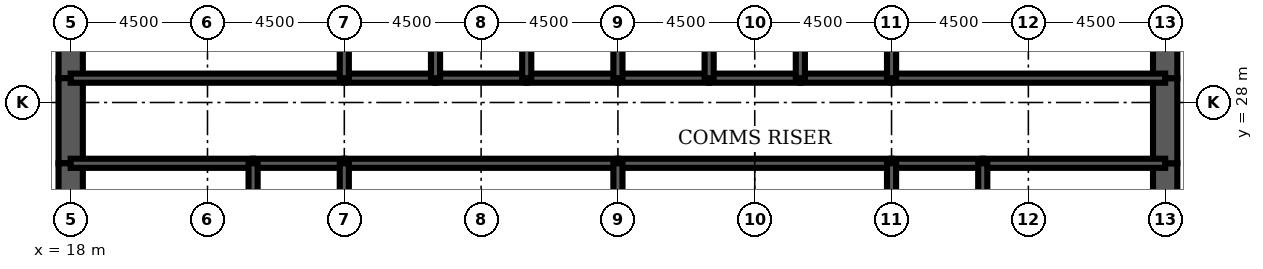
"""IFC4 building model, lengths in metres.
Left out: names, types, materials, properties, quantities, classifications, styles, units other than length and angle.
Written with IfcOpenShell. Run it as: python <this file> out.ifc"""

import sys

from ifc_helpers import new_model, si_unit, direction, frame, frame_2d, origin, place, context, subcontext, project, spatial, rectangle, extrude, element, fill, save


model = new_model("IFC4")
c1 = context("Model", 3, precision=1e-05, world=origin(), true_north=direction((0.0, 1.0)))
c2 = subcontext(c1, "Body", "Model", "MODEL_VIEW")
j1 = project(units=[si_unit("LENGTHUNIT", "METRE"), si_unit("PLANEANGLEUNIT", "RADIAN")], contexts=[c1])
p1 = place(None, origin())
s1 = spatial("IfcSite", under=j1, at=p1, CompositionType="ELEMENT")
p2 = place(p1, origin())
s2 = spatial("IfcBuilding", under=s1, at=p2, CompositionType="ELEMENT")
p3 = place(p2, frame((0.0, 0.0, 215.2)))
s3 = spatial("IfcBuildingStorey", under=s2, at=p3, CompositionType="ELEMENT", Elevation=215.2)
p4 = place(p3, frame((18.0, 32.0, 0.0), z_axis=(0.0, 0.0, 1.0), x_axis=(0.0, -1.0, 0.0)))
e1 = element("IfcWall", 1, at=p4, inside=s3, PredefinedType="SHEAR", context=c2, shape_type="SweptSolid", body=[
    extrude(rectangle(XDim=3.2, YDim=0.8, at=frame_2d((1.6, 0.0))), origin(), (0.0, 0.0, 1.0), 4.2),
])
p5 = place(p3, frame((18.0, 28.8, 0.0), z_axis=(0.0, 0.0, 1.0), x_axis=(0.0, -1.0, 0.0)))
e2 = element("IfcWall", 2, at=p5, inside=s3, PredefinedType="SHEAR", context=c2, shape_type="SweptSolid", body=[
    extrude(rectangle(XDim=2.8, YDim=0.8, at=frame_2d((1.4, 0.0))), origin(), (0.0, 0.0, 1.0), 4.2),
])
p6 = place(p5, frame((0.4, 0.0, 0.0)))
e3 = element("IfcOpeningElement", 3, at=p6, cuts=e2, PredefinedType="OPENING", context=c2, shape_type="SweptSolid", body=[
    extrude(rectangle(XDim=1.8, YDim=2.1, at=frame_2d((0.9, 1.05))), frame((0.0, 0.41, 0.0), z_axis=(0.0, -1.0, 0.0), x_axis=(1.0, 0.0, 0.0)), (0.0, 0.0, 1.0), 0.82),
])
for number, where, z_axis, x_axis in (
    (4, (18.0, 26.0, 0.0), (0.0, 0.0, 1.0), (0.0, -1.0, 0.0)),
    (5, (54.0, 22.0, 0.0), (0.0, 0.0, 1.0), (0.0, 1.0, 0.0)),
):
    element("IfcWall", number, at=place(p3, frame(where, z_axis=z_axis, x_axis=x_axis)), inside=s3, PredefinedType="SHEAR", context=c2, shape_type="SweptSolid", body=[
        extrude(rectangle(XDim=4.0, YDim=0.8, at=frame_2d((2.0, 0.0))), origin(), (0.0, 0.0, 1.0), 4.2),
    ])
p7 = place(p3, frame((54.0, 26.0, 0.0), z_axis=(0.0, 0.0, 1.0), x_axis=(0.0, 1.0, 0.0)))
e6 = element("IfcWall", 6, at=p7, inside=s3, PredefinedType="SHEAR", context=c2, shape_type="SweptSolid", body=[
    extrude(rectangle(XDim=2.8, YDim=0.8, at=frame_2d((1.4, 0.0))), origin(), (0.0, 0.0, 1.0), 4.2),
])
p8 = place(p7, frame((0.6, 0.0, 0.0)))
e7 = element("IfcOpeningElement", 7, at=p8, cuts=e6, PredefinedType="OPENING", context=c2, shape_type="SweptSolid", body=[
    extrude(rectangle(XDim=1.8, YDim=2.1, at=frame_2d((0.9, 1.05))), frame((0.0, 0.41, 0.0), z_axis=(0.0, -1.0, 0.0), x_axis=(1.0, 0.0, 0.0)), (0.0, 0.0, 1.0), 0.82),
])
p9 = place(p3, frame((54.0, 28.8, 0.0), z_axis=(0.0, 0.0, 1.0), x_axis=(0.0, 1.0, 0.0)))
e8 = element("IfcWall", 8, at=p9, inside=s3, PredefinedType="SHEAR", context=c2, shape_type="SweptSolid", body=[
    extrude(rectangle(XDim=3.2, YDim=0.8, at=frame_2d((1.6, 0.0))), origin(), (0.0, 0.0, 1.0), 4.2),
])
p10 = place(p3, frame((18.0, 28.8, 0.0), z_axis=(0.0, 0.0, 1.0), x_axis=(1.0, 0.0, 0.0)))
e9 = element("IfcWall", 9, at=p10, inside=s3, PredefinedType="SOLIDWALL", context=c2, shape_type="SweptSolid", body=[
    extrude(rectangle(XDim=9.0, YDim=0.3, at=frame_2d((4.5, 0.0))), origin(), (0.0, 0.0, 1.0), 4.2),
])
p11 = place(p10, frame((0.65, 0.0, 0.0)))
e10 = element("IfcOpeningElement", 10, at=p11, cuts=e9, PredefinedType="OPENING", context=c2, shape_type="SweptSolid", body=[
    extrude(rectangle(XDim=1.0, YDim=2.1, at=frame_2d((0.5, 1.05))), frame((0.0, 0.16, 0.0), z_axis=(0.0, -1.0, 0.0), x_axis=(1.0, 0.0, 0.0)), (0.0, 0.0, 1.0), 0.32),
])
p12 = place(p3, frame((27.0, 28.8, 0.0), z_axis=(0.0, 0.0, 1.0), x_axis=(1.0, 0.0, 0.0)))
e11 = element("IfcWall", 11, at=p12, inside=s3, PredefinedType="SOLIDWALL", context=c2, shape_type="SweptSolid", body=[
    extrude(rectangle(XDim=3.0, YDim=0.3, at=frame_2d((1.5, 0.0))), origin(), (0.0, 0.0, 1.0), 4.2),
])
p13 = place(p12, frame((0.95, 0.0, 0.0)))
e12 = element("IfcOpeningElement", 12, at=p13, cuts=e11, PredefinedType="OPENING", context=c2, shape_type="SweptSolid", body=[
    extrude(rectangle(XDim=1.1, YDim=2.2, at=frame_2d((0.55, 1.1))), frame((0.0, 0.16, 0.0), z_axis=(0.0, -1.0, 0.0), x_axis=(1.0, 0.0, 0.0)), (0.0, 0.0, 1.0), 0.32),
])
p14 = place(p3, frame((30.0, 28.8, 0.0), z_axis=(0.0, 0.0, 1.0), x_axis=(1.0, 0.0, 0.0)))
e13 = element("IfcWall", 13, at=p14, inside=s3, PredefinedType="SOLIDWALL", context=c2, shape_type="SweptSolid", body=[
    extrude(rectangle(XDim=3.0, YDim=0.3, at=frame_2d((1.5, 0.0))), origin(), (0.0, 0.0, 1.0), 4.2),
])
p15 = place(p14, frame((0.95, 0.0, 0.0)))
e14 = element("IfcOpeningElement", 14, at=p15, cuts=e13, PredefinedType="OPENING", context=c2, shape_type="SweptSolid", body=[
    extrude(rectangle(XDim=1.1, YDim=2.2, at=frame_2d((0.55, 1.1))), frame((0.0, 0.16, 0.0), z_axis=(0.0, -1.0, 0.0), x_axis=(1.0, 0.0, 0.0)), (0.0, 0.0, 1.0), 0.32),
])
p16 = place(p3, frame((33.0, 28.8, 0.0), z_axis=(0.0, 0.0, 1.0), x_axis=(1.0, 0.0, 0.0)))
e15 = element("IfcWall", 15, at=p16, inside=s3, PredefinedType="SOLIDWALL", context=c2, shape_type="SweptSolid", body=[
    extrude(rectangle(XDim=3.0, YDim=0.3, at=frame_2d((1.5, 0.0))), origin(), (0.0, 0.0, 1.0), 4.2),
])
p17 = place(p16, frame((0.95, 0.0, 0.0)))
e16 = element("IfcOpeningElement", 16, at=p17, cuts=e15, PredefinedType="OPENING", context=c2, shape_type="SweptSolid", body=[
    extrude(rectangle(XDim=1.1, YDim=2.2, at=frame_2d((0.55, 1.1))), frame((0.0, 0.16, 0.0), z_axis=(0.0, -1.0, 0.0), x_axis=(1.0, 0.0, 0.0)), (0.0, 0.0, 1.0), 0.32),
])
for number, where, z_axis, x_axis in (
    (17, (36.0, 28.8, 0.0), (0.0, 0.0, 1.0), (1.0, 0.0, 0.0)),
    (18, (39.0, 28.8, 0.0), (0.0, 0.0, 1.0), (1.0, 0.0, 0.0)),
):
    element("IfcWall", number, at=place(p3, frame(where, z_axis=z_axis, x_axis=x_axis)), inside=s3, PredefinedType="SOLIDWALL", context=c2, shape_type="SweptSolid", body=[
        extrude(rectangle(XDim=3.0, YDim=0.3, at=frame_2d((1.5, 0.0))), origin(), (0.0, 0.0, 1.0), 4.2),
    ])
p18 = place(p3, frame((42.0, 28.8, 0.0), z_axis=(0.0, 0.0, 1.0), x_axis=(1.0, 0.0, 0.0)))
e19 = element("IfcWall", 19, at=p18, inside=s3, PredefinedType="SOLIDWALL", context=c2, shape_type="SweptSolid", body=[
    extrude(rectangle(XDim=3.0, YDim=0.3, at=frame_2d((1.5, 0.0))), origin(), (0.0, 0.0, 1.0), 4.2),
])
p19 = place(p18, frame((0.95, 0.0, 0.0)))
e20 = element("IfcOpeningElement", 20, at=p19, cuts=e19, PredefinedType="OPENING", context=c2, shape_type="SweptSolid", body=[
    extrude(rectangle(XDim=1.1, YDim=2.2, at=frame_2d((0.55, 1.1))), frame((0.0, 0.16, 0.0), z_axis=(0.0, -1.0, 0.0), x_axis=(1.0, 0.0, 0.0)), (0.0, 0.0, 1.0), 0.32),
])
p20 = place(p3, frame((45.0, 28.8, 0.0), z_axis=(0.0, 0.0, 1.0), x_axis=(1.0, 0.0, 0.0)))
e21 = element("IfcWall", 21, at=p20, inside=s3, PredefinedType="SOLIDWALL", context=c2, shape_type="SweptSolid", body=[
    extrude(rectangle(XDim=9.0, YDim=0.3, at=frame_2d((4.5, 0.0))), origin(), (0.0, 0.0, 1.0), 4.2),
])
p21 = place(p20, frame((7.35, 0.0, 0.0)))
e22 = element("IfcOpeningElement", 22, at=p21, cuts=e21, PredefinedType="OPENING", context=c2, shape_type="SweptSolid", body=[
    extrude(rectangle(XDim=1.0, YDim=2.1, at=frame_2d((0.5, 1.05))), frame((0.0, 0.16, 0.0), z_axis=(0.0, -1.0, 0.0), x_axis=(1.0, 0.0, 0.0)), (0.0, 0.0, 1.0), 0.32),
])
p22 = place(p3, frame((18.0, 26.0, 0.0), z_axis=(0.0, 0.0, 1.0), x_axis=(1.0, 0.0, 0.0)))
e23 = element("IfcWall", 23, at=p22, inside=s3, PredefinedType="SOLIDWALL", context=c2, shape_type="SweptSolid", body=[
    extrude(rectangle(XDim=6.0, YDim=0.3, at=frame_2d((3.0, 0.0))), origin(), (0.0, 0.0, 1.0), 4.2),
])
p23 = place(p3, frame((24.0, 26.0, 0.0), z_axis=(0.0, 0.0, 1.0), x_axis=(1.0, 0.0, 0.0)))
e24 = element("IfcWall", 24, at=p23, inside=s3, PredefinedType="SOLIDWALL", context=c2, shape_type="SweptSolid", body=[
    extrude(rectangle(XDim=3.0, YDim=0.3, at=frame_2d((1.5, 0.0))), origin(), (0.0, 0.0, 1.0), 4.2),
])
for number, where, z_axis, x_axis in (
    (25, (27.0, 26.0, 0.0), (0.0, 0.0, 1.0), (1.0, 0.0, 0.0)),
    (26, (36.0, 26.0, 0.0), (0.0, 0.0, 1.0), (1.0, 0.0, 0.0)),
):
    element("IfcWall", number, at=place(p3, frame(where, z_axis=z_axis, x_axis=x_axis)), inside=s3, PredefinedType="SOLIDWALL", context=c2, shape_type="SweptSolid", body=[
        extrude(rectangle(XDim=9.0, YDim=0.3, at=frame_2d((4.5, 0.0))), origin(), (0.0, 0.0, 1.0), 4.2),
    ])
p24 = place(p3, frame((45.0, 26.0, 0.0), z_axis=(0.0, 0.0, 1.0), x_axis=(1.0, 0.0, 0.0)))
e27 = element("IfcWall", 27, at=p24, inside=s3, PredefinedType="SOLIDWALL", context=c2, shape_type="SweptSolid", body=[
    extrude(rectangle(XDim=3.0, YDim=0.3, at=frame_2d((1.5, 0.0))), origin(), (0.0, 0.0, 1.0), 4.2),
])
p25 = place(p3, frame((48.0, 26.0, 0.0), z_axis=(0.0, 0.0, 1.0), x_axis=(1.0, 0.0, 0.0)))
e28 = element("IfcWall", 28, at=p25, inside=s3, PredefinedType="SOLIDWALL", context=c2, shape_type="SweptSolid", body=[
    extrude(rectangle(XDim=6.0, YDim=0.3, at=frame_2d((3.0, 0.0))), origin(), (0.0, 0.0, 1.0), 4.2),
])
for number, where, z_axis, x_axis in (
    (29, (27.0, 28.8, 0.0), (0.0, 0.0, 1.0), (0.0, 1.0, 0.0)),
    (30, (30.0, 28.8, 0.0), (0.0, 0.0, 1.0), (0.0, 1.0, 0.0)),
    (31, (33.0, 28.8, 0.0), (0.0, 0.0, 1.0), (0.0, 1.0, 0.0)),
    (32, (36.0, 28.8, 0.0), (0.0, 0.0, 1.0), (0.0, 1.0, 0.0)),
    (33, (39.0, 28.8, 0.0), (0.0, 0.0, 1.0), (0.0, 1.0, 0.0)),
    (34, (42.0, 28.8, 0.0), (0.0, 0.0, 1.0), (0.0, 1.0, 0.0)),
    (35, (45.0, 28.8, 0.0), (0.0, 0.0, 1.0), (0.0, 1.0, 0.0)),
):
    element("IfcWall", number, at=place(p3, frame(where, z_axis=z_axis, x_axis=x_axis)), inside=s3, PredefinedType="SOLIDWALL", context=c2, shape_type="SweptSolid", body=[
        extrude(rectangle(XDim=3.2, YDim=0.3, at=frame_2d((1.6, 0.0))), origin(), (0.0, 0.0, 1.0), 4.2),
    ])
for number, where, z_axis, x_axis in (
    (36, (24.0, 22.0, 0.0), (0.0, 0.0, 1.0), (0.0, 1.0, 0.0)),
    (37, (27.0, 22.0, 0.0), (0.0, 0.0, 1.0), (0.0, 1.0, 0.0)),
    (38, (36.0, 22.0, 0.0), (0.0, 0.0, 1.0), (0.0, 1.0, 0.0)),
    (39, (45.0, 22.0, 0.0), (0.0, 0.0, 1.0), (0.0, 1.0, 0.0)),
    (40, (48.0, 22.0, 0.0), (0.0, 0.0, 1.0), (0.0, 1.0, 0.0)),
):
    element("IfcWall", number, at=place(p3, frame(where, z_axis=z_axis, x_axis=x_axis)), inside=s3, PredefinedType="SOLIDWALL", context=c2, shape_type="SweptSolid", body=[
        extrude(rectangle(XDim=4.0, YDim=0.3, at=frame_2d((2.0, 0.0))), origin(), (0.0, 0.0, 1.0), 4.2),
    ])
p26 = place(p3, frame((39.0, 22.15, 0.0), z_axis=(0.0, 0.0, 1.0), x_axis=(0.0, 1.0, 0.0)))
e41 = element("IfcWall", 41, at=p26, inside=s3, PredefinedType="PARTITIONING", context=c2, shape_type="SweptSolid", body=[
    extrude(rectangle(XDim=3.7, YDim=0.15, at=frame_2d((1.85, 0.0))), origin(), (0.0, 0.0, 1.0), 3.0),
])
p27 = place(p26, frame((2.2, 0.0, 0.0)))
e42 = element("IfcOpeningElement", 42, at=p27, cuts=e41, PredefinedType="OPENING", context=c2, shape_type="SweptSolid", body=[
    extrude(rectangle(XDim=1.0, YDim=2.1, at=frame_2d((0.5, 1.05))), frame((0.0, 0.085, 0.0), z_axis=(0.0, -1.0, 0.0), x_axis=(1.0, 0.0, 0.0)), (0.0, 0.0, 1.0), 0.17),
])
for number, where, z_axis, x_axis in (
    (43, (19.975, 22.15, 0.0), (0.0, 0.0, 1.0), (0.0, 1.0, 0.0)),
    (44, (51.425, 22.15, 0.0), (0.0, 0.0, 1.0), (0.0, 1.0, 0.0)),
):
    element("IfcWall", number, at=place(p3, frame(where, z_axis=z_axis, x_axis=x_axis)), inside=s3, PredefinedType="PARTITIONING", context=c2, shape_type="SweptSolid", body=[
        extrude(rectangle(XDim=3.7, YDim=0.15, at=frame_2d((1.85, 0.0))), origin(), (0.0, 0.0, 1.0), 3.0),
    ])
p28 = place(p27, origin())
e45 = element("IfcDoor", 45, at=p28, inside=s3, OperationType="SINGLE_SWING_RIGHT", PredefinedType="DOOR", context=c2, shape_type="SweptSolid", body=[
    extrude(rectangle(XDim=1.0, YDim=2.1, at=frame_2d((0.5, 1.05))), frame((0.0, 0.025, 0.0), z_axis=(0.0, -1.0, 0.0), x_axis=(1.0, 0.0, 0.0)), (0.0, 0.0, 1.0), 0.05),
])
fill(e42, e45)
p29 = place(p19, origin())
e46 = element("IfcDoor", 46, at=p29, inside=s3, OperationType="DOUBLE_DOOR_SLIDING", PredefinedType="USERDEFINED", context=c2, shape_type="SweptSolid", body=[
    extrude(rectangle(XDim=1.1, YDim=2.2, at=frame_2d((0.55, 1.1))), frame((0.0, 0.025, 0.0), z_axis=(0.0, -1.0, 0.0), x_axis=(1.0, 0.0, 0.0)), (0.0, 0.0, 1.0), 0.05),
])
fill(e20, e46)
p30 = place(p13, origin())
e47 = element("IfcDoor", 47, at=p30, inside=s3, OperationType="DOUBLE_DOOR_SLIDING", PredefinedType="USERDEFINED", context=c2, shape_type="SweptSolid", body=[
    extrude(rectangle(XDim=1.1, YDim=2.2, at=frame_2d((0.55, 1.1))), frame((0.0, 0.025, 0.0), z_axis=(0.0, -1.0, 0.0), x_axis=(1.0, 0.0, 0.0)), (0.0, 0.0, 1.0), 0.05),
])
fill(e12, e47)
p31 = place(p15, origin())
e48 = element("IfcDoor", 48, at=p31, inside=s3, OperationType="DOUBLE_DOOR_SLIDING", PredefinedType="USERDEFINED", context=c2, shape_type="SweptSolid", body=[
    extrude(rectangle(XDim=1.1, YDim=2.2, at=frame_2d((0.55, 1.1))), frame((0.0, 0.025, 0.0), z_axis=(0.0, -1.0, 0.0), x_axis=(1.0, 0.0, 0.0)), (0.0, 0.0, 1.0), 0.05),
])
fill(e14, e48)
p32 = place(p17, origin())
e49 = element("IfcDoor", 49, at=p32, inside=s3, OperationType="DOUBLE_DOOR_SLIDING", PredefinedType="USERDEFINED", context=c2, shape_type="SweptSolid", body=[
    extrude(rectangle(XDim=1.1, YDim=2.2, at=frame_2d((0.55, 1.1))), frame((0.0, 0.025, 0.0), z_axis=(0.0, -1.0, 0.0), x_axis=(1.0, 0.0, 0.0)), (0.0, 0.0, 1.0), 0.05),
])
fill(e16, e49)
p33 = place(p11, origin())
e50 = element("IfcDoor", 50, at=p33, inside=s3, OperationType="SINGLE_SWING_LEFT", PredefinedType="DOOR", context=c2, shape_type="SweptSolid", body=[
    extrude(rectangle(XDim=1.0, YDim=2.1, at=frame_2d((0.5, 1.05))), frame((0.0, 0.025, 0.0), z_axis=(0.0, -1.0, 0.0), x_axis=(1.0, 0.0, 0.0)), (0.0, 0.0, 1.0), 0.05),
])
fill(e10, e50)
p34 = place(p21, origin())
e51 = element("IfcDoor", 51, at=p34, inside=s3, OperationType="SINGLE_SWING_RIGHT", PredefinedType="DOOR", context=c2, shape_type="SweptSolid", body=[
    extrude(rectangle(XDim=1.0, YDim=2.1, at=frame_2d((0.5, 1.05))), frame((0.0, 0.025, 0.0), z_axis=(0.0, -1.0, 0.0), x_axis=(1.0, 0.0, 0.0)), (0.0, 0.0, 1.0), 0.05),
])
fill(e22, e51)
p35 = place(p6, origin())
e52 = element("IfcDoor", 52, at=p35, inside=s3, OperationType="SINGLE_SWING_LEFT", PredefinedType="DOOR", context=c2, shape_type="SweptSolid", body=[
    extrude(rectangle(XDim=1.8, YDim=2.1, at=frame_2d((0.9, 1.05))), frame((0.0, 0.4, 0.0), z_axis=(0.0, -1.0, 0.0), x_axis=(1.0, 0.0, 0.0)), (0.0, 0.0, 1.0), 0.8),
])
fill(e3, e52)
p36 = place(p8, origin())
e53 = element("IfcDoor", 53, at=p36, inside=s3, OperationType="SINGLE_SWING_LEFT", PredefinedType="DOOR", context=c2, shape_type="SweptSolid", body=[
    extrude(rectangle(XDim=1.8, YDim=2.1, at=frame_2d((0.9, 1.05))), frame((0.0, 0.4, 0.0), z_axis=(0.0, -1.0, 0.0), x_axis=(1.0, 0.0, 0.0)), (0.0, 0.0, 1.0), 0.8),
])
fill(e7, e53)
save(model, sys.argv[1])
